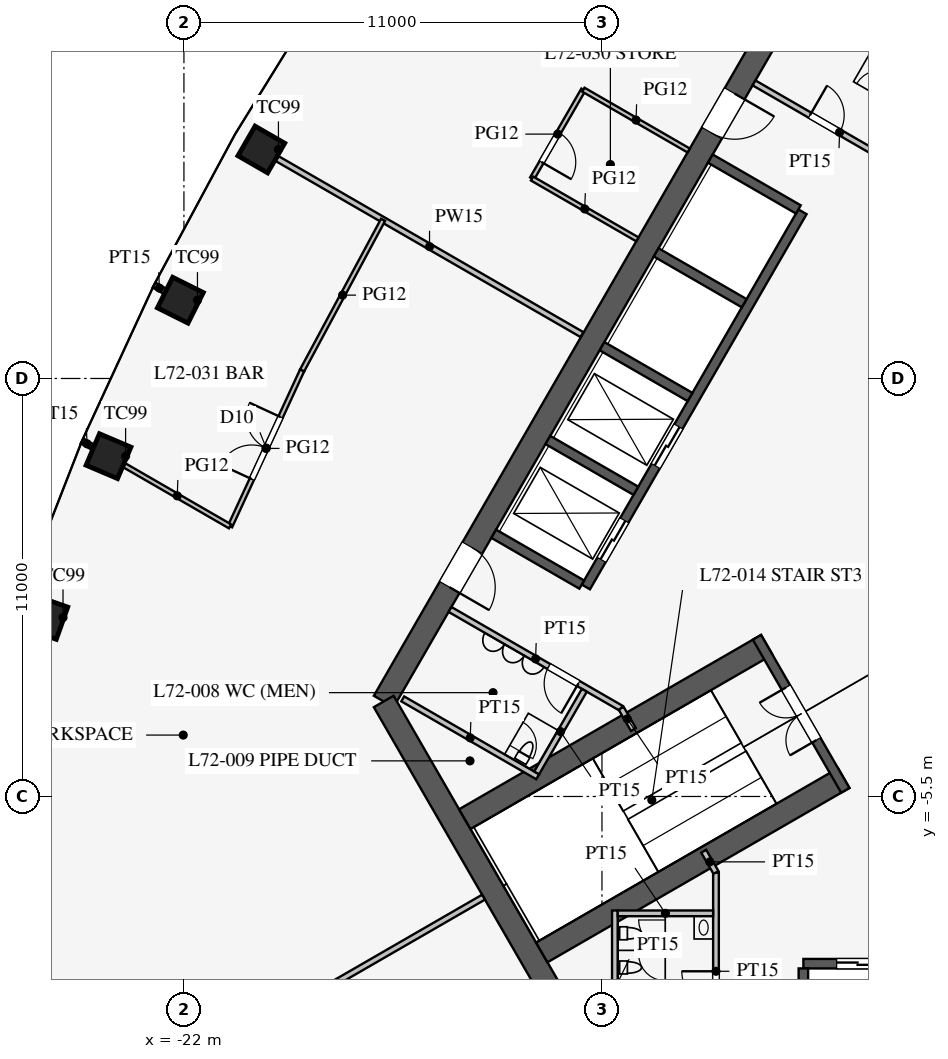
"""IFC4 building model, lengths in metres.
Left out: names, types, materials, properties, quantities, classifications, styles, units other than length and angle.
Written with IfcOpenShell. Run it as: python <this file> out.ifc"""

import sys

from ifc_helpers import new_model, si_unit, direction, frame, frame_2d, origin, origin_2d, place, context, subcontext, project, spatial, rectangle, extrude, element, fill, save


model = new_model("IFC4")
c1 = context("Model", 3, precision=1e-05, world=origin(), true_north=direction((0.0, 1.0)))
c2 = subcontext(c1, "Body", "Model", "MODEL_VIEW")
j1 = project(units=[si_unit("LENGTHUNIT", "METRE"), si_unit("PLANEANGLEUNIT", "RADIAN")], contexts=[c1])
p1 = place(None, origin())
s1 = spatial("IfcSite", under=j1, at=p1, CompositionType="ELEMENT")
p2 = place(p1, origin())
s2 = spatial("IfcBuilding", under=s1, at=p2, CompositionType="ELEMENT")
p3 = place(p2, frame((0.0, 0.0, 314.1)))
s3 = spatial("IfcBuildingStorey", under=s2, at=p3, CompositionType="ELEMENT", Elevation=314.1)
for number, where, z_axis, x_axis in (
    (1, (-19.963, 11.526, 0.0), (0.0, 0.0, 1.0), (-0.5, -0.866, 0.0)),
    (2, (-22.094, 7.56, 0.0), (0.0, 0.0, 1.0), (-0.447, -0.895, 0.0)),
    (3, (-23.985, 3.455, 0.0), (0.0, 0.0, 1.0), (-0.391, -0.92, 0.0)),
    (4, (-25.632, -0.79, 0.0), (0.0, 0.0, 1.0), (-0.334, -0.942, 0.0)),
):
    element("IfcColumn", number, at=place(p3, frame(where, z_axis=z_axis, x_axis=x_axis)), inside=s3, PredefinedType="COLUMN", context=c2, shape_type="SweptSolid", body=[
        extrude(rectangle(XDim=0.9, YDim=0.9, at=origin_2d()), origin(), (0.0, 0.0, 1.0), 4.2),
    ])
p4 = place(p3, frame((-5.773, 16.0, 0.0), z_axis=(0.0, 0.0, 1.0), x_axis=(-0.500002442456, -0.866023993627, 0.0)))
e5 = element("IfcWall", 5, at=p4, inside=s3, PredefinedType="SHEAR", context=c2, shape_type="SweptSolid", body=[
    extrude(rectangle(XDim=21.939, YDim=0.6, at=frame_2d((10.97, 0.0))), origin(), (0.0, 0.0, 1.0), 4.2),
])
p5 = place(p4, frame((17.27, 0.0, 0.0)))
e6 = element("IfcOpeningElement", 6, at=p5, cuts=e5, PredefinedType="OPENING", context=c2, shape_type="SweptSolid", body=[
    extrude(rectangle(XDim=1.2, YDim=2.1, at=frame_2d((0.6, 1.05))), frame((0.0, 0.31, 0.0), z_axis=(0.0, -1.0, 0.0), x_axis=(1.0, 0.0, 0.0)), (0.0, 0.0, 1.0), 0.62),
])
p6 = place(p4, frame((3.47, 0.0, 0.0)))
e7 = element("IfcOpeningElement", 7, at=p6, cuts=e5, PredefinedType="OPENING", context=c2, shape_type="SweptSolid", body=[
    extrude(rectangle(XDim=1.2, YDim=2.1, at=frame_2d((0.6, 1.05))), frame((0.0, 0.31, 0.0), z_axis=(0.0, -1.0, 0.0), x_axis=(1.0, 0.0, 0.0)), (0.0, 0.0, 1.0), 0.62),
])
p7 = place(p3, frame((-16.743, -3.0, 0.0), z_axis=(0.0, 0.0, 1.0), x_axis=(0.499995765644, -0.866027848477, 0.0)))
e8 = element("IfcWall", 8, at=p7, inside=s3, PredefinedType="SHEAR", context=c2, shape_type="SweptSolid", body=[
    extrude(rectangle(XDim=11.547, YDim=0.6, at=frame_2d((5.773, 0.0))), origin(), (0.0, 0.0, 1.0), 4.2),
])
p8 = place(p3, frame((-5.7, -9.9, 0.0), z_axis=(0.0, 0.0, 1.0), x_axis=(1.0, 0.0, 0.0)))
e9 = element("IfcWall", 9, at=p8, inside=s3, PredefinedType="SHEAR", context=c2, shape_type="SweptSolid", body=[
    extrude(rectangle(XDim=11.4, YDim=0.25, at=frame_2d((5.7, 0.0))), origin(), (0.0, 0.0, 1.0), 4.2),
])
p9 = place(p8, frame((0.875, 0.0, 0.0)))
e10 = element("IfcOpeningElement", 10, at=p9, cuts=e9, PredefinedType="OPENING", context=c2, shape_type="SweptSolid", body=[
    extrude(rectangle(XDim=1.1, YDim=2.2, at=frame_2d((0.55, 1.1))), frame((0.0, 0.135, 0.0), z_axis=(0.0, -1.0, 0.0), x_axis=(1.0, 0.0, 0.0)), (0.0, 0.0, 1.0), 0.27),
])
p10 = place(p8, frame((3.725, 0.0, 0.0)))
e11 = element("IfcOpeningElement", 11, at=p10, cuts=e9, PredefinedType="OPENING", context=c2, shape_type="SweptSolid", body=[
    extrude(rectangle(XDim=1.1, YDim=2.2, at=frame_2d((0.55, 1.1))), frame((0.0, 0.135, 0.0), z_axis=(0.0, -1.0, 0.0), x_axis=(1.0, 0.0, 0.0)), (0.0, 0.0, 1.0), 0.27),
])
p11 = place(p8, frame((6.575, 0.0, 0.0)))
e12 = element("IfcOpeningElement", 12, at=p11, cuts=e9, PredefinedType="OPENING", context=c2, shape_type="SweptSolid", body=[
    extrude(rectangle(XDim=1.1, YDim=2.2, at=frame_2d((0.55, 1.1))), frame((0.0, 0.135, 0.0), z_axis=(0.0, -1.0, 0.0), x_axis=(1.0, 0.0, 0.0)), (0.0, 0.0, 1.0), 0.27),
])
p12 = place(p8, frame((9.425, 0.0, 0.0)))
e13 = element("IfcOpeningElement", 13, at=p12, cuts=e9, PredefinedType="OPENING", context=c2, shape_type="SweptSolid", body=[
    extrude(rectangle(XDim=1.1, YDim=2.2, at=frame_2d((0.55, 1.1))), frame((0.0, 0.135, 0.0), z_axis=(0.0, -1.0, 0.0), x_axis=(1.0, 0.0, 0.0)), (0.0, 0.0, 1.0), 0.27),
])
p13 = place(p3, frame((-5.7, -10.025, 0.0), z_axis=(0.0, 0.0, 1.0), x_axis=(0.0, -1.0, 0.0)))
e14 = element("IfcWall", 14, at=p13, inside=s3, PredefinedType="SHEAR", context=c2, shape_type="SweptSolid", body=[
    extrude(rectangle(XDim=2.675, YDim=0.25, at=frame_2d((1.337, 0.0))), origin(), (0.0, 0.0, 1.0), 4.2),
])
p14 = place(p3, frame((-5.724, 9.886, 0.0), z_axis=(0.0, 0.0, 1.0), x_axis=(-0.500001763848, -0.866024385424, 0.0)))
e15 = element("IfcWall", 15, at=p14, inside=s3, PredefinedType="SHEAR", context=c2, shape_type="SweptSolid", body=[
    extrude(rectangle(XDim=11.4, YDim=0.25, at=frame_2d((5.7, 0.0))), origin(), (0.0, 0.0, 1.0), 4.2),
])
p15 = place(p14, frame((6.525, 0.0, 0.0)))
e16 = element("IfcOpeningElement", 16, at=p15, cuts=e15, PredefinedType="OPENING", context=c2, shape_type="SweptSolid", body=[
    extrude(rectangle(XDim=1.2, YDim=2.2, at=frame_2d((0.6, 1.1))), frame((0.0, 0.135, 0.0), z_axis=(0.0, -1.0, 0.0), x_axis=(1.0, 0.0, 0.0)), (0.0, 0.0, 1.0), 0.27),
])
p16 = place(p14, frame((9.375, 0.0, 0.0)))
e17 = element("IfcOpeningElement", 17, at=p16, cuts=e15, PredefinedType="OPENING", context=c2, shape_type="SweptSolid", body=[
    extrude(rectangle(XDim=1.2, YDim=2.2, at=frame_2d((0.6, 1.1))), frame((0.0, 0.135, 0.0), z_axis=(0.0, -1.0, 0.0), x_axis=(1.0, 0.0, 0.0)), (0.0, 0.0, 1.0), 0.27),
])
for number, where, z_axis, x_axis in (
    (18, (-5.832, 9.949, 0.0), (0.0, 0.0, 1.0), (-0.866, 0.5, 0.0)),
    (19, (-7.257, 7.481, 0.0), (0.0, 0.0, 1.0), (-0.866, 0.5, 0.0)),
    (20, (-8.682, 5.012, 0.0), (0.0, 0.0, 1.0), (-0.866, 0.5, 0.0)),
    (21, (-10.107, 2.544, 0.0), (0.0, 0.0, 1.0), (-0.866, 0.5, 0.0)),
    (22, (-11.532, 0.076, 0.0), (0.0, 0.0, 1.0), (-0.866, 0.5, 0.0)),
):
    element("IfcWall", number, at=place(p3, frame(where, z_axis=z_axis, x_axis=x_axis)), inside=s3, PredefinedType="SHEAR", context=c2, shape_type="SweptSolid", body=[
        extrude(rectangle(XDim=2.675, YDim=0.25, at=frame_2d((1.337, 0.0))), origin(), (0.0, 0.0, 1.0), 4.2),
    ])
p17 = place(p3, frame((-6.663, -1.509, 0.0), z_axis=(0.0, 0.0, 1.0), x_axis=(-0.86603049496, -0.499991181721, 0.0)))
e23 = element("IfcWall", 23, at=p17, inside=s3, PredefinedType="SHEAR", context=c2, shape_type="SweptSolid", body=[
    extrude(rectangle(XDim=9.175, YDim=0.6, at=frame_2d((4.587, 0.0))), origin(), (0.0, 0.0, 1.0), 4.2),
])
p18 = place(p3, frame((-4.638, -5.016, 0.0), z_axis=(0.0, 0.0, 1.0), x_axis=(-0.866012320003, -0.50002266109, 0.0)))
e24 = element("IfcWall", 24, at=p18, inside=s3, PredefinedType="SHEAR", context=c2, shape_type="SweptSolid", body=[
    extrude(rectangle(XDim=9.175, YDim=0.6, at=frame_2d((4.587, 0.0))), origin(), (0.0, 0.0, 1.0), 4.2),
])
p19 = place(p3, frame((-6.922, -1.312, 0.0), z_axis=(0.0, 0.0, 1.0), x_axis=(0.499984536904, -0.866034331223, 0.0)))
e25 = element("IfcWall", 25, at=p19, inside=s3, PredefinedType="SHEAR", context=c2, shape_type="SweptSolid", body=[
    extrude(rectangle(XDim=4.65, YDim=0.25, at=frame_2d((2.325, 0.0))), origin(), (0.0, 0.0, 1.0), 4.2),
])
p20 = place(p19, frame((1.525, 0.0, 0.0)))
e26 = element("IfcOpeningElement", 26, at=p20, cuts=e25, PredefinedType="OPENING", context=c2, shape_type="SweptSolid", body=[
    extrude(rectangle(XDim=1.6, YDim=2.1, at=frame_2d((0.8, 1.05))), frame((0.0, 0.135, 0.0), z_axis=(0.0, -1.0, 0.0), x_axis=(1.0, 0.0, 0.0)), (0.0, 0.0, 1.0), 0.27),
])
p21 = place(p3, frame((-8.0, -7.5, 0.0), z_axis=(0.0, 0.0, 1.0), x_axis=(0.0, -1.0, 0.0)))
e27 = element("IfcWall", 27, at=p21, inside=s3, PredefinedType="PARTITIONING", context=c2, shape_type="SweptSolid", body=[
    extrude(rectangle(XDim=5.2, YDim=0.15, at=frame_2d((2.6, 0.0))), origin(), (0.0, 0.0, 1.0), 4.0),
])
p22 = place(p21, frame((2.6, 0.0, 0.0)))
e28 = element("IfcOpeningElement", 28, at=p22, cuts=e27, PredefinedType="OPENING", context=c2, shape_type="SweptSolid", body=[
    extrude(rectangle(XDim=0.9, YDim=2.1, at=frame_2d((0.45, 1.05))), frame((0.0, 0.085, 0.0), z_axis=(0.0, -1.0, 0.0), x_axis=(1.0, 0.0, 0.0)), (0.0, 0.0, 1.0), 0.17),
])
p23 = place(p3, frame((-10.495, -3.178, 0.0), z_axis=(0.0, 0.0, 1.0), x_axis=(-0.866021400173, 0.500006934395, 0.0)))
e29 = element("IfcWall", 29, at=p23, inside=s3, PredefinedType="PARTITIONING", context=c2, shape_type="SweptSolid", body=[
    extrude(rectangle(XDim=5.2, YDim=0.15, at=frame_2d((2.6, 0.0))), origin(), (0.0, 0.0, 1.0), 4.0),
])
p24 = place(p23, frame((1.3, 0.0, 0.0)))
e30 = element("IfcOpeningElement", 30, at=p24, cuts=e29, PredefinedType="OPENING", context=c2, shape_type="SweptSolid", body=[
    extrude(rectangle(XDim=0.9, YDim=2.1, at=frame_2d((0.45, 1.05))), frame((0.0, 0.085, 0.0), z_axis=(0.0, -1.0, 0.0), x_axis=(1.0, 0.0, 0.0)), (0.0, 0.0, 1.0), 0.17),
])
p25 = place(p3, frame((-2.495, 10.678, 0.0), z_axis=(0.0, 0.0, 1.0), x_axis=(-0.866021400173, 0.500006934395, 0.0)))
e31 = element("IfcWall", 31, at=p25, inside=s3, PredefinedType="PARTITIONING", context=c2, shape_type="SweptSolid", body=[
    extrude(rectangle(XDim=5.2, YDim=0.15, at=frame_2d((2.6, 0.0))), origin(), (0.0, 0.0, 1.0), 4.0),
])
p26 = place(p25, frame((2.6, 0.0, 0.0)))
e32 = element("IfcOpeningElement", 32, at=p26, cuts=e31, PredefinedType="OPENING", context=c2, shape_type="SweptSolid", body=[
    extrude(rectangle(XDim=0.9, YDim=2.1, at=frame_2d((0.45, 1.05))), frame((0.0, 0.085, 0.0), z_axis=(0.0, -1.0, 0.0), x_axis=(1.0, 0.0, 0.0)), (0.0, 0.0, 1.0), 0.17),
])
for number, where, z_axis, x_axis in (
    (33, (-10.495, -3.178, 0.0), (0.0, 0.0, 1.0), (0.5, -0.866, 0.0)),
    (34, (-8.0, -7.5, 0.0), (0.0, 0.0, 1.0), (-0.5, 0.866, 0.0)),
):
    element("IfcWall", number, at=place(p3, frame(where, z_axis=z_axis, x_axis=x_axis)), inside=s3, PredefinedType="PARTITIONING", context=c2, shape_type="SweptSolid", body=[
        extrude(rectangle(XDim=0.645, YDim=0.15, at=frame_2d((0.323, 0.0))), origin(), (0.0, 0.0, 1.0), 4.0),
    ])
p27 = place(p3, frame((-12.691, -4.982, 0.0), z_axis=(0.0, 0.0, 1.0), x_axis=(-0.8660249478, 0.500000789788, 0.0)))
e35 = element("IfcWall", 35, at=p27, inside=s3, PredefinedType="PARTITIONING", context=c2, shape_type="SweptSolid", body=[
    extrude(rectangle(XDim=4.1, YDim=0.15, at=frame_2d((2.05, 0.0))), origin(), (0.0, 0.0, 1.0), 4.0),
])
p28 = place(p3, frame((-11.464, -2.706, 0.0), z_axis=(0.0, 0.0, 1.0), x_axis=(-0.50001992892, -0.866013897511, 0.0)))
e36 = element("IfcWall", 36, at=p28, inside=s3, PredefinedType="PARTITIONING", context=c2, shape_type="SweptSolid", body=[
    extrude(rectangle(XDim=2.51, YDim=0.15, at=frame_2d((1.255, 0.0))), origin(), (0.0, 0.0, 1.0), 4.0),
])
p29 = place(p3, frame((-10.66, -8.5, 0.0), z_axis=(0.0, 0.0, 1.0), x_axis=(0.0, -1.0, 0.0)))
e37 = element("IfcWall", 37, at=p29, inside=s3, PredefinedType="PARTITIONING", context=c2, shape_type="SweptSolid", body=[
    extrude(rectangle(XDim=4.1, YDim=0.15, at=frame_2d((2.05, 0.0))), origin(), (0.0, 0.0, 1.0), 4.0),
])
p30 = place(p3, frame((-8.075, -8.575, 0.0), z_axis=(0.0, 0.0, 1.0), x_axis=(-1.0, 0.0, 0.0)))
e38 = element("IfcWall", 38, at=p30, inside=s3, PredefinedType="PARTITIONING", context=c2, shape_type="SweptSolid", body=[
    extrude(rectangle(XDim=2.51, YDim=0.15, at=frame_2d((1.255, 0.0))), origin(), (0.0, 0.0, 1.0), 4.0),
])
p31 = place(p3, frame((-14.116, -8.15, 0.0), z_axis=(0.0, 0.0, 1.0), x_axis=(-0.866020541135, -0.500008422262, 0.0)))
e39 = element("IfcWall", 39, at=p31, inside=s3, PredefinedType="PARTITIONING", context=c2, shape_type="SweptSolid", body=[
    extrude(rectangle(XDim=13.45, YDim=0.15, at=frame_2d((6.725, 0.0))), origin(), (0.0, 0.0, 1.0), 2.5),
])
p32 = place(p3, frame((-11.527, 6.655, 0.0), z_axis=(0.0, 0.0, 1.0), x_axis=(-0.866021846952, 0.500006160563, 0.0)))
e40 = element("IfcWall", 40, at=p32, inside=s3, PredefinedType="PARTITIONING", context=c2, shape_type="SweptSolid", body=[
    extrude(rectangle(XDim=9.262, YDim=0.15, at=frame_2d((4.631, 0.0))), origin(), (0.0, 0.0, 1.0), 3.3),
])
p33 = place(p3, frame((-11.49, 13.1, 0.0), z_axis=(0.0, 0.0, 1.0), x_axis=(-0.4999416173, -0.866059108428, 0.0)))
e41 = element("IfcWall", 41, at=p33, inside=s3, PredefinedType="PARTITIONING", context=c2, shape_type="SweptSolid", body=[
    extrude(rectangle(XDim=2.7, YDim=0.12, at=frame_2d((1.35, 0.0))), origin(), (0.0, 0.0, 1.0), 2.9),
])
p34 = place(p33, frame((1.3, 0.0, 0.15)))
e42 = element("IfcOpeningElement", 42, at=p34, cuts=e41, PredefinedType="OPENING", context=c2, shape_type="SweptSolid", body=[
    extrude(rectangle(XDim=0.9, YDim=2.1, at=frame_2d((0.45, 1.05))), frame((0.0, 0.07, 0.0), z_axis=(0.0, -1.0, 0.0), x_axis=(1.0, 0.0, 0.0)), (0.0, 0.0, 1.0), 0.14),
])
p35 = place(p3, frame((-10.068, 9.161, 0.0), z_axis=(0.0, 0.0, 1.0), x_axis=(-0.866008981251, 0.500028443584, 0.0)))
e43 = element("IfcWall", 43, at=p35, inside=s3, PredefinedType="PARTITIONING", context=c2, shape_type="SweptSolid", body=[
    extrude(rectangle(XDim=3.2, YDim=0.12, at=frame_2d((1.6, 0.0))), origin(), (0.0, 0.0, 1.0), 2.9),
])
p36 = place(p3, frame((-8.718, 11.5, 0.0), z_axis=(0.0, 0.0, 1.0), x_axis=(-0.866028054938, 0.499995408039, 0.0)))
e44 = element("IfcWall", 44, at=p36, inside=s3, PredefinedType="PARTITIONING", context=c2, shape_type="SweptSolid", body=[
    extrude(rectangle(XDim=3.2, YDim=0.12, at=frame_2d((1.6, 0.0))), origin(), (0.0, 0.0, 1.0), 2.9),
])
p37 = place(p3, frame((-22.51, 7.8, 0.0), z_axis=(0.0, 0.0, 1.0), x_axis=(-0.866095534226, 0.499878510834, 0.0)))
e45 = element("IfcWall", 45, at=p37, inside=s3, PredefinedType="PARTITIONING", context=c2, shape_type="SweptSolid", body=[
    extrude(rectangle(XDim=0.316, YDim=0.15, at=frame_2d((0.158, 0.0))), origin(), (0.0, 0.0, 1.0), 2.9),
])
p38 = place(p3, frame((-24.422, 3.708, 0.0), z_axis=(0.0, 0.0, 1.0), x_axis=(-0.866254317358, 0.499603300288, 0.0)))
e46 = element("IfcWall", 46, at=p38, inside=s3, PredefinedType="PARTITIONING", context=c2, shape_type="SweptSolid", body=[
    extrude(rectangle(XDim=0.296, YDim=0.15, at=frame_2d((0.148, 0.0))), origin(), (0.0, 0.0, 1.0), 2.9),
])
p39 = place(p3, frame((-16.759, 9.676, 0.0), z_axis=(0.0, 0.0, 1.0), x_axis=(-0.473524102582, -0.880780860529, 0.0)))
e47 = element("IfcWall", 47, at=p39, inside=s3, PredefinedType="PARTITIONING", context=c2, shape_type="SweptSolid", body=[
    extrude(rectangle(XDim=4.502, YDim=0.12, at=frame_2d((2.251, 0.0))), origin(), (0.0, 0.0, 1.0), 2.9),
])
p40 = place(p3, frame((-18.891, 5.71, 0.0), z_axis=(0.0, 0.0, 1.0), x_axis=(-0.419335693458, -0.907831248742, 0.0)))
e48 = element("IfcWall", 48, at=p40, inside=s3, PredefinedType="PARTITIONING", context=c2, shape_type="SweptSolid", body=[
    extrude(rectangle(XDim=4.519, YDim=0.12, at=frame_2d((2.259, 0.0))), origin(), (0.0, 0.0, 1.0), 2.9),
])
p41 = place(p40, frame((1.35, 0.0, 0.15)))
e49 = element("IfcOpeningElement", 49, at=p41, cuts=e48, PredefinedType="OPENING", context=c2, shape_type="SweptSolid", body=[
    extrude(rectangle(XDim=1.8, YDim=2.1, at=frame_2d((0.9, 1.05))), frame((0.0, 0.07, 0.0), z_axis=(0.0, -1.0, 0.0), x_axis=(1.0, 0.0, 0.0)), (0.0, 0.0, 1.0), 0.14),
])
p42 = place(p3, frame((-20.786, 1.608, 0.0), z_axis=(0.0, 0.0, 1.0), x_axis=(-0.866039964284, 0.499974779627, 0.0)))
e50 = element("IfcWall", 50, at=p42, inside=s3, PredefinedType="PARTITIONING", context=c2, shape_type="SweptSolid", body=[
    extrude(rectangle(XDim=3.211, YDim=0.12, at=frame_2d((1.605, 0.0))), origin(), (0.0, 0.0, 1.0), 2.9),
])
p43 = place(p22, frame((0.9, 0.0, 0.0), z_axis=(0.0, 0.0, 1.0), x_axis=(-1.0, 0.0, 0.0)))
e51 = element("IfcDoor", 51, at=p43, inside=s3, OperationType="SINGLE_SWING_RIGHT", PredefinedType="DOOR", context=c2, shape_type="SweptSolid", body=[
    extrude(rectangle(XDim=0.9, YDim=2.1, at=frame_2d((0.45, 1.05))), frame((0.0, 0.025, 0.0), z_axis=(0.0, -1.0, 0.0), x_axis=(1.0, 0.0, 0.0)), (0.0, 0.0, 1.0), 0.05),
])
fill(e28, e51)
p44 = place(p24, origin())
e52 = element("IfcDoor", 52, at=p44, inside=s3, OperationType="SINGLE_SWING_LEFT", PredefinedType="DOOR", context=c2, shape_type="SweptSolid", body=[
    extrude(rectangle(XDim=0.9, YDim=2.1, at=frame_2d((0.45, 1.05))), frame((0.0, 0.025, 0.0), z_axis=(0.0, -1.0, 0.0), x_axis=(1.0, 0.0, 0.0)), (0.0, 0.0, 1.0), 0.05),
])
fill(e30, e52)
p45 = place(p26, frame((0.9, 0.0, 0.0), z_axis=(0.0, 0.0, 1.0), x_axis=(-1.0, 0.0, 0.0)))
e53 = element("IfcDoor", 53, at=p45, inside=s3, OperationType="SINGLE_SWING_LEFT", PredefinedType="DOOR", context=c2, shape_type="SweptSolid", body=[
    extrude(rectangle(XDim=0.9, YDim=2.1, at=frame_2d((0.45, 1.05))), frame((0.0, 0.025, 0.0), z_axis=(0.0, -1.0, 0.0), x_axis=(1.0, 0.0, 0.0)), (0.0, 0.0, 1.0), 0.05),
])
fill(e32, e53)
p46 = place(p20, frame((1.6, 0.0, 0.0), z_axis=(0.0, 0.0, 1.0), x_axis=(-1.0, 0.0, 0.0)))
e54 = element("IfcDoor", 54, at=p46, inside=s3, OperationType="DOUBLE_DOOR_SINGLE_SWING", PredefinedType="DOOR", context=c2, shape_type="SweptSolid", body=[
    extrude(rectangle(XDim=1.6, YDim=2.1, at=frame_2d((0.8, 1.05))), frame((0.0, 0.025, 0.0), z_axis=(0.0, -1.0, 0.0), x_axis=(1.0, 0.0, 0.0)), (0.0, 0.0, 1.0), 0.05),
])
fill(e26, e54)
p47 = place(p5, origin())
e55 = element("IfcDoor", 55, at=p47, inside=s3, OperationType="SINGLE_SWING_RIGHT", PredefinedType="DOOR", context=c2, shape_type="SweptSolid", body=[
    extrude(rectangle(XDim=1.2, YDim=2.1, at=frame_2d((0.6, 1.05))), frame((0.0, 0.025, 0.0), z_axis=(0.0, -1.0, 0.0), x_axis=(1.0, 0.0, 0.0)), (0.0, 0.0, 1.0), 0.05),
])
fill(e6, e55)
p48 = place(p6, origin())
e56 = element("IfcDoor", 56, at=p48, inside=s3, OperationType="SINGLE_SWING_LEFT", PredefinedType="DOOR", context=c2, shape_type="SweptSolid", body=[
    extrude(rectangle(XDim=1.2, YDim=2.1, at=frame_2d((0.6, 1.05))), frame((0.0, 0.025, 0.0), z_axis=(0.0, -1.0, 0.0), x_axis=(1.0, 0.0, 0.0)), (0.0, 0.0, 1.0), 0.05),
])
fill(e7, e56)
p49 = place(p34, origin())
e57 = element("IfcDoor", 57, at=p49, inside=s3, OperationType="SINGLE_SWING_RIGHT", PredefinedType="DOOR", context=c2, shape_type="SweptSolid", body=[
    extrude(rectangle(XDim=0.9, YDim=2.1, at=frame_2d((0.45, 1.05))), frame((0.0, 0.025, 0.0), z_axis=(0.0, -1.0, 0.0), x_axis=(1.0, 0.0, 0.0)), (0.0, 0.0, 1.0), 0.05),
])
fill(e42, e57)
p50 = place(p41, frame((1.8, 0.0, 0.0), z_axis=(0.0, 0.0, 1.0), x_axis=(-1.0, 0.0, 0.0)))
e58 = element("IfcDoor", 58, at=p50, inside=s3, OperationType="DOUBLE_DOOR_SINGLE_SWING", PredefinedType="DOOR", context=c2, shape_type="SweptSolid", body=[
    extrude(rectangle(XDim=1.8, YDim=2.1, at=frame_2d((0.9, 1.05))), frame((0.0, 0.025, 0.0), z_axis=(0.0, -1.0, 0.0), x_axis=(1.0, 0.0, 0.0)), (0.0, 0.0, 1.0), 0.05),
])
fill(e49, e58)
p51 = place(p9, origin())
e59 = element("IfcDoor", 59, at=p51, inside=s3, OperationType="DOUBLE_DOOR_SLIDING", PredefinedType="DOOR", context=c2, shape_type="SweptSolid", body=[
    extrude(rectangle(XDim=1.1, YDim=2.2, at=frame_2d((0.55, 1.1))), frame((0.0, 0.025, 0.0), z_axis=(0.0, -1.0, 0.0), x_axis=(1.0, 0.0, 0.0)), (0.0, 0.0, 1.0), 0.05),
])
fill(e10, e59)
p52 = place(p15, origin())
e60 = element("IfcDoor", 60, at=p52, inside=s3, OperationType="DOUBLE_DOOR_SLIDING", PredefinedType="DOOR", context=c2, shape_type="SweptSolid", body=[
    extrude(rectangle(XDim=1.2, YDim=2.2, at=frame_2d((0.6, 1.1))), frame((0.0, 0.025, 0.0), z_axis=(0.0, -1.0, 0.0), x_axis=(1.0, 0.0, 0.0)), (0.0, 0.0, 1.0), 0.05),
])
fill(e16, e60)
p53 = place(p16, origin())
e61 = element("IfcDoor", 61, at=p53, inside=s3, OperationType="DOUBLE_DOOR_SLIDING", PredefinedType="DOOR", context=c2, shape_type="SweptSolid", body=[
    extrude(rectangle(XDim=1.2, YDim=2.2, at=frame_2d((0.6, 1.1))), frame((0.0, 0.025, 0.0), z_axis=(0.0, -1.0, 0.0), x_axis=(1.0, 0.0, 0.0)), (0.0, 0.0, 1.0), 0.05),
])
fill(e17, e61)
save(model, sys.argv[1])
